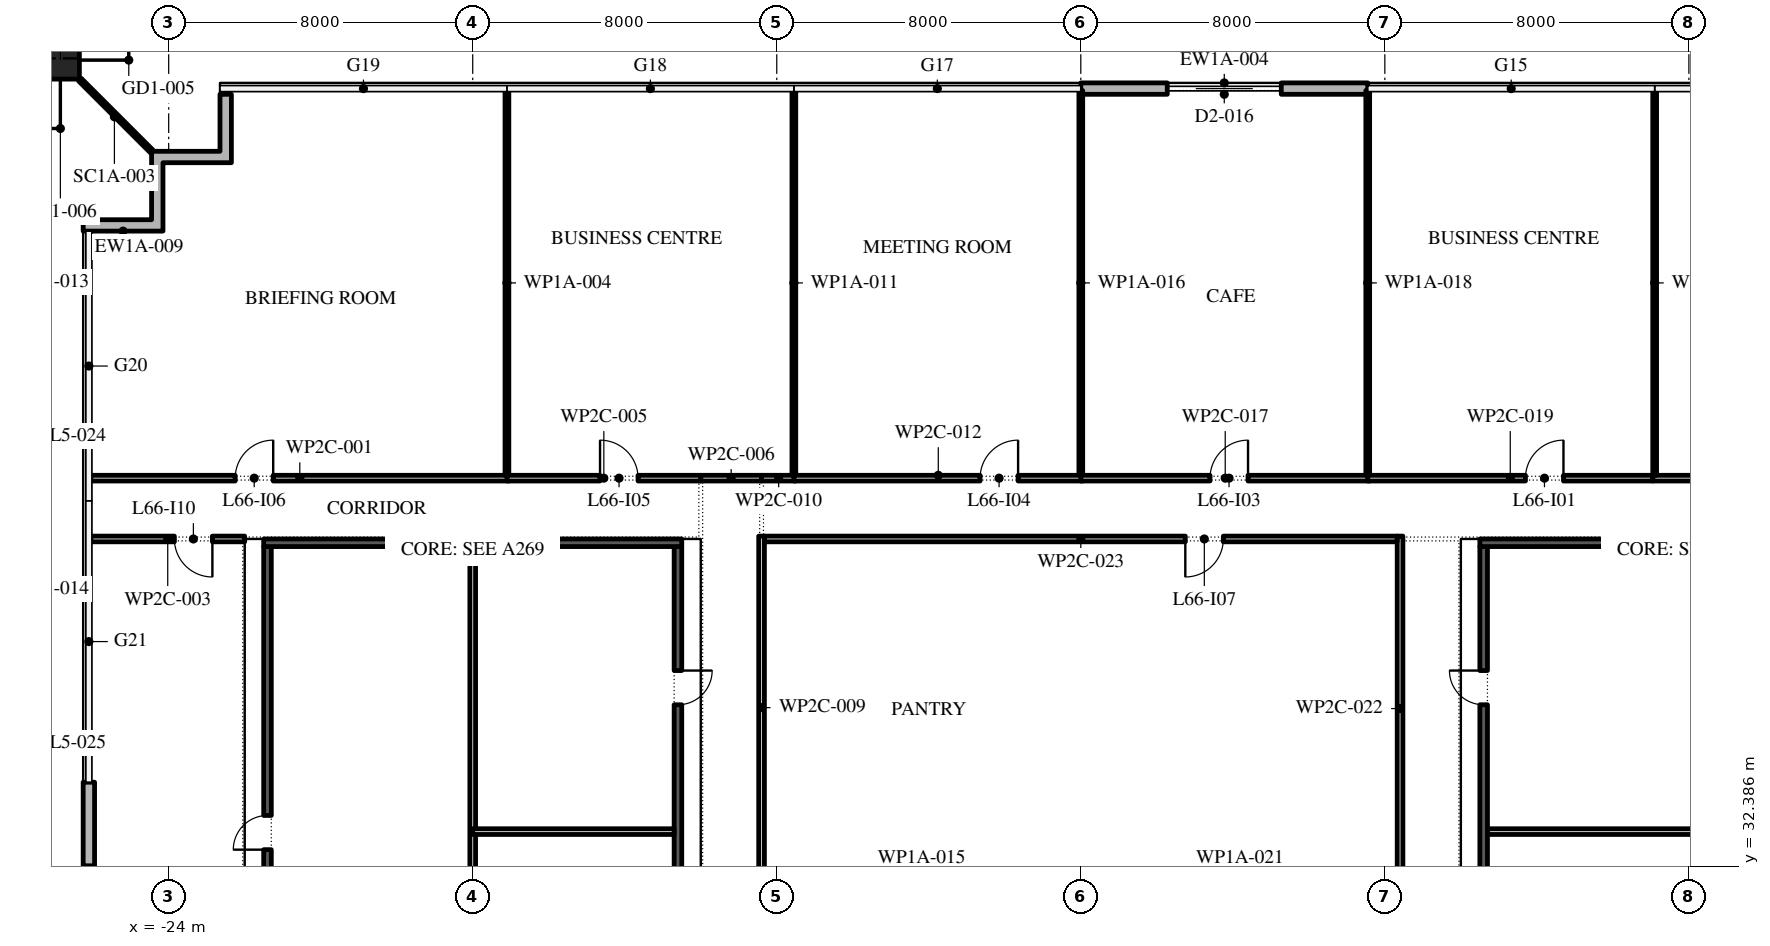
"""IFC4 building model, lengths in metres.
Left out: names, types, materials, properties, quantities, classifications, styles, units other than length and angle.
Written with IfcOpenShell. Run it as: python <this file> out.ifc"""

import sys

from ifc_helpers import new_model, si_unit, direction, frame, frame_2d, origin, origin_2d, place, context, subcontext, project, spatial, polyline, rectangle, outline, extrude, element, fill, save


model = new_model("IFC4")
c1 = context("Model", 3, precision=1e-05, world=origin(), true_north=direction((0.0, 1.0)))
c2 = subcontext(c1, "Body", "Model", "MODEL_VIEW")
j1 = project(units=[si_unit("LENGTHUNIT", "METRE"), si_unit("PLANEANGLEUNIT", "RADIAN")], contexts=[c1])
p1 = place(None, origin())
s1 = spatial("IfcSite", under=j1, at=p1, CompositionType="ELEMENT")
p2 = place(p1, origin())
s2 = spatial("IfcBuilding", under=s1, at=p2, CompositionType="ELEMENT")
p3 = place(p2, frame((0.0, 0.0, 303.0)))
s3 = spatial("IfcBuildingStorey", under=s2, at=p3, CompositionType="ELEMENT", Elevation=303.0)
p4 = place(p3, frame((-26.85, 53.6, 0.0), z_axis=(0.0, 0.090528438609, 0.995893870753), x_axis=(-1.0, 0.0, 0.0)))
e1 = element("IfcColumn", 1, at=p4, inside=s3, PredefinedType="COLUMN", context=c2, shape_type="SweptSolid", body=[
    extrude(rectangle(XDim=1.0, YDim=1.0, at=origin_2d()), origin(), (0.0, 0.0, 1.0), 6.025),
])
p5 = place(p3, frame((7.55, 52.85, 0.0), z_axis=(0.0, 0.0, 1.0), x_axis=(-1.0, 0.0, 0.0)))
e2 = element("IfcWall", 2, at=p5, inside=s3, PredefinedType="STANDARD", context=c2, shape_type="SweptSolid", body=[
    extrude(rectangle(XDim=7.55, YDim=0.3, at=frame_2d((3.775, 0.0))), origin(), (0.0, 0.0, 1.0), 5.8),
])
p6 = place(p5, frame((2.275, 0.0, 0.0)))
e3 = element("IfcOpeningElement", 3, at=p6, cuts=e2, PredefinedType="OPENING", context=c2, shape_type="SweptSolid", body=[
    extrude(rectangle(XDim=3.0, YDim=3.5, at=frame_2d((1.5, 1.75))), frame((0.0, 0.16, 0.0), z_axis=(0.0, -1.0, 0.0), x_axis=(1.0, 0.0, 0.0)), (0.0, 0.0, 1.0), 0.32),
])
p7 = place(p3, frame((-26.1, 34.6, 0.0), z_axis=(0.0, 0.0, 1.0), x_axis=(0.0, -1.0, 0.0)))
e4 = element("IfcWall", 4, at=p7, inside=s3, PredefinedType="STANDARD", context=c2, shape_type="SweptSolid", body=[
    extrude(rectangle(XDim=7.4, YDim=0.3, at=frame_2d((3.7, 0.0))), origin(), (0.0, 0.0, 1.0), 5.8),
])
p8 = place(p7, frame((2.2, 0.0, 0.0)))
e5 = element("IfcOpeningElement", 5, at=p8, cuts=e4, PredefinedType="OPENING", context=c2, shape_type="SweptSolid", body=[
    extrude(rectangle(XDim=3.0, YDim=3.5, at=frame_2d((1.5, 1.75))), frame((0.0, 0.16, 0.0), z_axis=(0.0, -1.0, 0.0), x_axis=(1.0, 0.0, 0.0)), (0.0, 0.0, 1.0), 0.32),
])
p9 = place(p3, origin())
e6 = element("IfcWall", 6, at=p9, inside=s3, PredefinedType="STANDARD", context=c2, shape_type="SweptSolid", body=[
    extrude(outline(polyline([(-24.45, 49.4), (-24.45, 51.2), (-22.65, 51.2), (-22.65, 52.7), (-22.35, 52.7), (-22.35, 50.9), (-24.15, 50.9), (-24.15, 49.1), (-26.25, 49.1), (-26.25, 49.4), (-24.45, 49.4)])), origin(), (0.0, 0.0, 1.0), 5.8),
])
p10 = place(p3, frame((-24.45, 51.2, 0.0), z_axis=(0.0, 0.0, 1.0), x_axis=(-0.707106781187, 0.707106781187, 0.0)))
e7 = element("IfcWall", 7, at=p10, inside=s3, PredefinedType="STANDARD", context=c2, shape_type="SweptSolid", body=[
    extrude(rectangle(XDim=2.667, YDim=0.1, at=frame_2d((1.333, 0.0))), origin(), (0.0, 0.0, 1.0), 5.8),
])
p11 = place(p3, frame((-21.4, 25.75, 0.0), z_axis=(0.0, 0.0, 1.0), x_axis=(0.0, 1.0, 0.0)))
e8 = element("IfcWall", 8, at=p11, inside=s3, PredefinedType="SHEAR", context=c2, shape_type="SweptSolid", body=[
    extrude(rectangle(XDim=15.05, YDim=0.2, at=frame_2d((7.525, 0.0))), origin(), (0.0, 0.0, 1.0), 5.8),
])
p12 = place(p11, frame((7.075, 0.0, 0.0)))
e9 = element("IfcOpeningElement", 9, at=p12, cuts=e8, PredefinedType="OPENING", context=c2, shape_type="SweptSolid", body=[
    extrude(rectangle(XDim=0.9, YDim=2.1, at=frame_2d((0.45, 1.05))), frame((0.0, 0.11, 0.0), z_axis=(0.0, -1.0, 0.0), x_axis=(1.0, 0.0, 0.0)), (0.0, 0.0, 1.0), 0.22),
])
p13 = place(p3, frame((-10.6, 25.75, 0.0), z_axis=(0.0, 0.0, 1.0), x_axis=(0.0, 1.0, 0.0)))
e10 = element("IfcWall", 10, at=p13, inside=s3, PredefinedType="SHEAR", context=c2, shape_type="SweptSolid", body=[
    extrude(rectangle(XDim=15.05, YDim=0.2, at=frame_2d((7.525, 0.0))), origin(), (0.0, 0.0, 1.0), 5.8),
])
p14 = place(p13, frame((3.288, 0.0, 0.0)))
e11 = element("IfcOpeningElement", 11, at=p14, cuts=e10, PredefinedType="OPENING", context=c2, shape_type="SweptSolid", body=[
    extrude(rectangle(XDim=0.9, YDim=2.1, at=frame_2d((0.45, 1.05))), frame((0.0, 0.11, 0.0), z_axis=(0.0, -1.0, 0.0), x_axis=(1.0, 0.0, 0.0)), (0.0, 0.0, 1.0), 0.22),
])
p15 = place(p13, frame((10.887, 0.0, 0.0)))
e12 = element("IfcOpeningElement", 12, at=p15, cuts=e10, PredefinedType="OPENING", context=c2, shape_type="SweptSolid", body=[
    extrude(rectangle(XDim=0.9, YDim=2.1, at=frame_2d((0.45, 1.05))), frame((0.0, 0.11, 0.0), z_axis=(0.0, -1.0, 0.0), x_axis=(1.0, 0.0, 0.0)), (0.0, 0.0, 1.0), 0.22),
])
p16 = place(p3, frame((-21.5, 40.9, 0.0), z_axis=(0.0, 0.0, 1.0), x_axis=(1.0, 0.0, 0.0)))
e13 = element("IfcWall", 13, at=p16, inside=s3, PredefinedType="SHEAR", context=c2, shape_type="SweptSolid", body=[
    extrude(rectangle(XDim=11.0, YDim=0.2, at=frame_2d((5.5, 0.0))), origin(), (0.0, 0.0, 1.0), 5.8),
])
p17 = place(p3, frame((-16.0, 25.75, 0.0), z_axis=(0.0, 0.0, 1.0), x_axis=(0.0, 1.0, 0.0)))
e14 = element("IfcWall", 14, at=p17, inside=s3, PredefinedType="PARTITIONING", context=c2, shape_type="SweptSolid", body=[
    extrude(rectangle(XDim=15.05, YDim=0.15, at=frame_2d((7.525, 0.0))), origin(), (0.0, 0.0, 1.0), 5.8),
])
p18 = place(p3, frame((-16.0, 33.3, 0.0), z_axis=(0.0, 0.0, 1.0), x_axis=(1.0, 0.0, 0.0)))
e15 = element("IfcWall", 15, at=p18, inside=s3, PredefinedType="PARTITIONING", context=c2, shape_type="SweptSolid", body=[
    extrude(rectangle(XDim=5.3, YDim=0.15, at=frame_2d((2.65, 0.0))), origin(), (0.0, 0.0, 1.0), 5.8),
])
p19 = place(p3, frame((10.6, 25.75, 0.0), z_axis=(0.0, 0.0, 1.0), x_axis=(0.0, 1.0, 0.0)))
e16 = element("IfcWall", 16, at=p19, inside=s3, PredefinedType="SHEAR", context=c2, shape_type="SweptSolid", body=[
    extrude(rectangle(XDim=15.05, YDim=0.2, at=frame_2d((7.525, 0.0))), origin(), (0.0, 0.0, 1.0), 5.8),
])
p20 = place(p19, frame((3.288, 0.0, 0.0)))
e17 = element("IfcOpeningElement", 17, at=p20, cuts=e16, PredefinedType="OPENING", context=c2, shape_type="SweptSolid", body=[
    extrude(rectangle(XDim=0.9, YDim=2.1, at=frame_2d((0.45, 1.05))), frame((0.0, 0.11, 0.0), z_axis=(0.0, -1.0, 0.0), x_axis=(1.0, 0.0, 0.0)), (0.0, 0.0, 1.0), 0.22),
])
p21 = place(p19, frame((10.887, 0.0, 0.0)))
e18 = element("IfcOpeningElement", 18, at=p21, cuts=e16, PredefinedType="OPENING", context=c2, shape_type="SweptSolid", body=[
    extrude(rectangle(XDim=0.9, YDim=2.1, at=frame_2d((0.45, 1.05))), frame((0.0, 0.11, 0.0), z_axis=(0.0, -1.0, 0.0), x_axis=(1.0, 0.0, 0.0)), (0.0, 0.0, 1.0), 0.22),
])
p22 = place(p3, frame((10.5, 40.9, 0.0), z_axis=(0.0, 0.0, 1.0), x_axis=(1.0, 0.0, 0.0)))
e19 = element("IfcWall", 19, at=p22, inside=s3, PredefinedType="SHEAR", context=c2, shape_type="SweptSolid", body=[
    extrude(rectangle(XDim=11.0, YDim=0.2, at=frame_2d((5.5, 0.0))), origin(), (0.0, 0.0, 1.0), 5.8),
])
p23 = place(p3, frame((10.7, 33.3, 0.0), z_axis=(0.0, 0.0, 1.0), x_axis=(1.0, 0.0, 0.0)))
e20 = element("IfcWall", 20, at=p23, inside=s3, PredefinedType="PARTITIONING", context=c2, shape_type="SweptSolid", body=[
    extrude(rectangle(XDim=10.6, YDim=0.15, at=frame_2d((5.3, 0.0))), origin(), (0.0, 0.0, 1.0), 5.8),
])
p24 = place(p3, frame((-26.05, 42.6, 0.0), z_axis=(0.0, 0.0, 1.0), x_axis=(1.0, 0.0, 0.0)))
e21 = element("IfcWall", 21, at=p24, inside=s3, PredefinedType="PARTITIONING", context=c2, shape_type="SweptSolid", body=[
    extrude(rectangle(XDim=11.0, YDim=0.15, at=frame_2d((5.5, 0.0))), origin(), (0.0, 0.0, 1.0), 5.8),
])
p25 = place(p24, frame((3.8, 0.0, 0.0)))
e22 = element("IfcOpeningElement", 22, at=p25, cuts=e21, PredefinedType="OPENING", context=c2, shape_type="SweptSolid", body=[
    extrude(rectangle(XDim=1.0, YDim=2.1, at=frame_2d((0.5, 1.05))), frame((0.0, 0.085, 0.0), z_axis=(0.0, -1.0, 0.0), x_axis=(1.0, 0.0, 0.0)), (0.0, 0.0, 1.0), 0.17),
])
p26 = place(p3, frame((-22.0, 41.0, 0.0), z_axis=(0.0, 0.0, 1.0), x_axis=(-1.0, 0.0, 0.0)))
e23 = element("IfcWall", 23, at=p26, inside=s3, PredefinedType="PARTITIONING", context=c2, shape_type="SweptSolid", body=[
    extrude(rectangle(XDim=4.05, YDim=0.15, at=frame_2d((2.025, 0.0))), origin(), (0.0, 0.0, 1.0), 5.8),
])
p27 = place(p26, frame((0.85, 0.0, 0.0)))
e24 = element("IfcOpeningElement", 24, at=p27, cuts=e23, PredefinedType="OPENING", context=c2, shape_type="SweptSolid", body=[
    extrude(rectangle(XDim=1.0, YDim=2.1, at=frame_2d((0.5, 1.05))), frame((0.0, 0.085, 0.0), z_axis=(0.0, -1.0, 0.0), x_axis=(1.0, 0.0, 0.0)), (0.0, 0.0, 1.0), 0.17),
])
p28 = place(p3, frame((-15.1, 42.675, 0.0), z_axis=(0.0, 0.0, 1.0), x_axis=(0.0, 1.0, 0.0)))
e25 = element("IfcWall", 25, at=p28, inside=s3, PredefinedType="PARTITIONING", context=c2, shape_type="SweptSolid", body=[
    extrude(rectangle(XDim=10.125, YDim=0.1, at=frame_2d((5.062, 0.0))), origin(), (0.0, 0.0, 1.0), 5.8),
])
p29 = place(p3, frame((-15.1, 42.6, 0.0), z_axis=(0.0, 0.0, 1.0), x_axis=(1.0, 0.0, 0.0)))
e26 = element("IfcWall", 26, at=p29, inside=s3, PredefinedType="PARTITIONING", context=c2, shape_type="SweptSolid", body=[
    extrude(rectangle(XDim=5.1, YDim=0.15, at=frame_2d((2.55, 0.0))), origin(), (0.0, 0.0, 1.0), 5.8),
])
p30 = place(p29, frame((2.45, 0.0, 0.0)))
e27 = element("IfcOpeningElement", 27, at=p30, cuts=e26, PredefinedType="OPENING", context=c2, shape_type="SweptSolid", body=[
    extrude(rectangle(XDim=1.0, YDim=2.1, at=frame_2d((0.5, 1.05))), frame((0.0, 0.085, 0.0), z_axis=(0.0, -1.0, 0.0), x_axis=(1.0, 0.0, 0.0)), (0.0, 0.0, 1.0), 0.17),
])
p31 = place(p3, frame((-10.0, 42.6, 0.0), z_axis=(0.0, 0.0, 1.0), x_axis=(1.0, 0.0, 0.0)))
e28 = element("IfcWall", 28, at=p31, inside=s3, PredefinedType="PARTITIONING", context=c2, shape_type="SweptSolid", body=[
    extrude(rectangle(XDim=1.6, YDim=0.15, at=frame_2d((0.8, 0.0))), origin(), (0.0, 0.0, 1.0), 5.8),
])
p32 = place(p3, frame((-8.4, 41.075, 0.0), z_axis=(0.0, 0.0, 1.0), x_axis=(0.0, -1.0, 0.0)))
e29 = element("IfcWall", 29, at=p32, inside=s3, PredefinedType="PARTITIONING", context=c2, shape_type="SweptSolid", body=[
    extrude(rectangle(XDim=9.025, YDim=0.15, at=frame_2d((4.512, 0.0))), origin(), (0.0, 0.0, 1.0), 5.8),
])
p33 = place(p3, frame((-8.4, 42.6, 0.0), z_axis=(0.0, 0.0, 1.0), x_axis=(1.0, 0.0, 0.0)))
e30 = element("IfcWall", 30, at=p33, inside=s3, PredefinedType="PARTITIONING", context=c2, shape_type="SweptSolid", body=[
    extrude(rectangle(XDim=0.9, YDim=0.15, at=frame_2d((0.45, 0.0))), origin(), (0.0, 0.0, 1.0), 5.8),
])
p34 = place(p3, frame((-7.55, 42.675, 0.0), z_axis=(0.0, 0.0, 1.0), x_axis=(0.0, 1.0, 0.0)))
e31 = element("IfcWall", 31, at=p34, inside=s3, PredefinedType="PARTITIONING", context=c2, shape_type="SweptSolid", body=[
    extrude(rectangle(XDim=10.125, YDim=0.1, at=frame_2d((5.062, 0.0))), origin(), (0.0, 0.0, 1.0), 5.8),
])
p35 = place(p3, frame((-7.55, 42.6, 0.0), z_axis=(0.0, 0.0, 1.0), x_axis=(1.0, 0.0, 0.0)))
e32 = element("IfcWall", 32, at=p35, inside=s3, PredefinedType="PARTITIONING", context=c2, shape_type="SweptSolid", body=[
    extrude(rectangle(XDim=7.6, YDim=0.15, at=frame_2d((3.8, 0.0))), origin(), (0.0, 0.0, 1.0), 5.8),
])
p36 = place(p35, frame((4.9, 0.0, 0.0)))
e33 = element("IfcOpeningElement", 33, at=p36, cuts=e32, PredefinedType="OPENING", context=c2, shape_type="SweptSolid", body=[
    extrude(rectangle(XDim=1.0, YDim=2.1, at=frame_2d((0.5, 1.05))), frame((0.0, 0.085, 0.0), z_axis=(0.0, -1.0, 0.0), x_axis=(1.0, 0.0, 0.0)), (0.0, 0.0, 1.0), 0.17),
])
p37 = place(p3, frame((0.0, 42.675, 0.0), z_axis=(0.0, 0.0, 1.0), x_axis=(0.0, 1.0, 0.0)))
e34 = element("IfcWall", 34, at=p37, inside=s3, PredefinedType="PARTITIONING", context=c2, shape_type="SweptSolid", body=[
    extrude(rectangle(XDim=10.125, YDim=0.1, at=frame_2d((5.062, 0.0))), origin(), (0.0, 0.0, 1.0), 5.8),
])
p38 = place(p3, frame((0.0, 42.6, 0.0), z_axis=(0.0, 0.0, 1.0), x_axis=(1.0, 0.0, 0.0)))
e35 = element("IfcWall", 35, at=p38, inside=s3, PredefinedType="PARTITIONING", context=c2, shape_type="SweptSolid", body=[
    extrude(rectangle(XDim=7.6, YDim=0.15, at=frame_2d((3.8, 0.0))), origin(), (0.0, 0.0, 1.0), 5.8),
])
p39 = place(p38, frame((3.4, 0.0, 0.0)))
e36 = element("IfcOpeningElement", 36, at=p39, cuts=e35, PredefinedType="OPENING", context=c2, shape_type="SweptSolid", body=[
    extrude(rectangle(XDim=1.0, YDim=2.1, at=frame_2d((0.5, 1.05))), frame((0.0, 0.085, 0.0), z_axis=(0.0, -1.0, 0.0), x_axis=(1.0, 0.0, 0.0)), (0.0, 0.0, 1.0), 0.17),
])
p40 = place(p3, frame((7.55, 42.675, 0.0), z_axis=(0.0, 0.0, 1.0), x_axis=(0.0, 1.0, 0.0)))
e37 = element("IfcWall", 37, at=p40, inside=s3, PredefinedType="PARTITIONING", context=c2, shape_type="SweptSolid", body=[
    extrude(rectangle(XDim=10.125, YDim=0.1, at=frame_2d((5.062, 0.0))), origin(), (0.0, 0.0, 1.0), 5.8),
])
p41 = place(p3, frame((7.55, 42.6, 0.0), z_axis=(0.0, 0.0, 1.0), x_axis=(1.0, 0.0, 0.0)))
e38 = element("IfcWall", 38, at=p41, inside=s3, PredefinedType="PARTITIONING", context=c2, shape_type="SweptSolid", body=[
    extrude(rectangle(XDim=7.5, YDim=0.15, at=frame_2d((3.75, 0.0))), origin(), (0.0, 0.0, 1.0), 5.8),
])
p42 = place(p41, frame((4.15, 0.0, 0.0)))
e39 = element("IfcOpeningElement", 39, at=p42, cuts=e38, PredefinedType="OPENING", context=c2, shape_type="SweptSolid", body=[
    extrude(rectangle(XDim=1.0, YDim=2.1, at=frame_2d((0.5, 1.05))), frame((0.0, 0.085, 0.0), z_axis=(0.0, -1.0, 0.0), x_axis=(1.0, 0.0, 0.0)), (0.0, 0.0, 1.0), 0.17),
])
p43 = place(p3, frame((8.4, 32.0, 0.0), z_axis=(0.0, 0.0, 1.0), x_axis=(0.0, 1.0, 0.0)))
e40 = element("IfcWall", 40, at=p43, inside=s3, PredefinedType="PARTITIONING", context=c2, shape_type="SweptSolid", body=[
    extrude(rectangle(XDim=9.075, YDim=0.15, at=frame_2d((4.538, 0.0))), origin(), (0.0, 0.0, 1.0), 5.8),
])
p44 = place(p3, frame((8.325, 41.0, 0.0), z_axis=(0.0, 0.0, 1.0), x_axis=(-1.0, 0.0, 0.0)))
e41 = element("IfcWall", 41, at=p44, inside=s3, PredefinedType="PARTITIONING", context=c2, shape_type="SweptSolid", body=[
    extrude(rectangle(XDim=16.65, YDim=0.15, at=frame_2d((8.325, 0.0))), origin(), (0.0, 0.0, 1.0), 5.8),
])
p45 = place(p44, frame((4.575, 0.0, 0.0)))
e42 = element("IfcOpeningElement", 42, at=p45, cuts=e41, PredefinedType="OPENING", context=c2, shape_type="SweptSolid", body=[
    extrude(rectangle(XDim=1.0, YDim=2.1, at=frame_2d((0.5, 1.05))), frame((0.0, 0.085, 0.0), z_axis=(0.0, -1.0, 0.0), x_axis=(1.0, 0.0, 0.0)), (0.0, 0.0, 1.0), 0.17),
])
p46 = place(p3, frame((15.05, 42.6, 0.0), z_axis=(0.0, 0.0, 1.0), x_axis=(1.0, 0.0, 0.0)))
e43 = element("IfcWall", 43, at=p46, inside=s3, PredefinedType="PARTITIONING", context=c2, shape_type="SweptSolid", body=[
    extrude(rectangle(XDim=11.0, YDim=0.15, at=frame_2d((5.5, 0.0))), origin(), (0.0, 0.0, 1.0), 5.8),
])
p47 = place(p46, frame((5.05, 0.0, 0.0)))
e44 = element("IfcOpeningElement", 44, at=p47, cuts=e43, PredefinedType="OPENING", context=c2, shape_type="SweptSolid", body=[
    extrude(rectangle(XDim=1.0, YDim=2.1, at=frame_2d((0.5, 1.05))), frame((0.0, 0.085, 0.0), z_axis=(0.0, -1.0, 0.0), x_axis=(1.0, 0.0, 0.0)), (0.0, 0.0, 1.0), 0.17),
])
p48 = place(p3, frame((15.1, 52.8, 0.0), z_axis=(0.0, 0.0, 1.0), x_axis=(0.0, -1.0, 0.0)))
e45 = element("IfcWall", 45, at=p48, inside=s3, PredefinedType="PARTITIONING", context=c2, shape_type="SweptSolid", body=[
    extrude(rectangle(XDim=10.125, YDim=0.1, at=frame_2d((5.062, 0.0))), origin(), (0.0, 0.0, 1.0), 5.8),
])
p49 = place(p6, origin())
e46 = element("IfcDoor", 46, at=p49, inside=s3, OperationType="DOUBLE_DOOR_SLIDING", PredefinedType="DOOR", context=c2, shape_type="SweptSolid", body=[
    extrude(rectangle(XDim=3.0, YDim=3.5, at=frame_2d((1.5, 1.75))), frame((0.0, 0.025, 0.0), z_axis=(0.0, -1.0, 0.0), x_axis=(1.0, 0.0, 0.0)), (0.0, 0.0, 1.0), 0.05),
])
fill(e3, e46)
p50 = place(p8, origin())
e47 = element("IfcDoor", 47, at=p50, inside=s3, OperationType="DOUBLE_DOOR_SLIDING", PredefinedType="DOOR", context=c2, shape_type="SweptSolid", body=[
    extrude(rectangle(XDim=3.0, YDim=3.5, at=frame_2d((1.5, 1.75))), frame((0.0, 0.025, 0.0), z_axis=(0.0, -1.0, 0.0), x_axis=(1.0, 0.0, 0.0)), (0.0, 0.0, 1.0), 0.05),
])
fill(e5, e47)
p51 = place(p12, origin())
e48 = element("IfcDoor", 48, at=p51, inside=s3, OperationType="SINGLE_SWING_RIGHT", PredefinedType="DOOR", context=c2, shape_type="SweptSolid", body=[
    extrude(rectangle(XDim=0.9, YDim=2.1, at=frame_2d((0.45, 1.05))), frame((0.0, -0.05, 0.0), z_axis=(0.0, -1.0, 0.0), x_axis=(1.0, 0.0, 0.0)), (0.0, 0.0, 1.0), 0.05),
])
fill(e9, e48)
p52 = place(p15, frame((0.9, 0.15, 0.0), z_axis=(0.0, 0.0, 1.0), x_axis=(-1.0, 0.0, 0.0)))
e49 = element("IfcDoor", 49, at=p52, inside=s3, OperationType="SINGLE_SWING_RIGHT", PredefinedType="DOOR", context=c2, shape_type="SweptSolid", body=[
    extrude(rectangle(XDim=0.9, YDim=2.1, at=frame_2d((0.45, 1.05))), frame((0.0, 0.1, 0.0), z_axis=(0.0, -1.0, 0.0), x_axis=(1.0, 0.0, 0.0)), (0.0, 0.0, 1.0), 0.05),
])
fill(e12, e49)
p53 = place(p21, origin())
e50 = element("IfcDoor", 50, at=p53, inside=s3, OperationType="SINGLE_SWING_LEFT", PredefinedType="DOOR", context=c2, shape_type="SweptSolid", body=[
    extrude(rectangle(XDim=0.9, YDim=2.1, at=frame_2d((0.45, 1.05))), frame((0.0, -0.05, 0.0), z_axis=(0.0, -1.0, 0.0), x_axis=(1.0, 0.0, 0.0)), (0.0, 0.0, 1.0), 0.05),
])
fill(e18, e50)
p54 = place(p42, origin())
e51 = element("IfcDoor", 51, at=p54, inside=s3, OperationType="SINGLE_SWING_LEFT", PredefinedType="DOOR", context=c2, shape_type="SweptSolid", body=[
    extrude(rectangle(XDim=1.0, YDim=2.1, at=frame_2d((0.5, 1.05))), frame((0.0, 0.025, 0.0), z_axis=(0.0, -1.0, 0.0), x_axis=(1.0, 0.0, 0.0)), (0.0, 0.0, 1.0), 0.05),
])
fill(e39, e51)
p55 = place(p39, origin())
e52 = element("IfcDoor", 52, at=p55, inside=s3, OperationType="SINGLE_SWING_LEFT", PredefinedType="DOOR", context=c2, shape_type="SweptSolid", body=[
    extrude(rectangle(XDim=1.0, YDim=2.1, at=frame_2d((0.5, 1.05))), frame((0.0, 0.025, 0.0), z_axis=(0.0, -1.0, 0.0), x_axis=(1.0, 0.0, 0.0)), (0.0, 0.0, 1.0), 0.05),
])
fill(e36, e52)
p56 = place(p36, origin())
e53 = element("IfcDoor", 53, at=p56, inside=s3, OperationType="SINGLE_SWING_LEFT", PredefinedType="DOOR", context=c2, shape_type="SweptSolid", body=[
    extrude(rectangle(XDim=1.0, YDim=2.1, at=frame_2d((0.5, 1.05))), frame((0.0, 0.025, 0.0), z_axis=(0.0, -1.0, 0.0), x_axis=(1.0, 0.0, 0.0)), (0.0, 0.0, 1.0), 0.05),
])
fill(e33, e53)
p57 = place(p30, origin())
e54 = element("IfcDoor", 54, at=p57, inside=s3, OperationType="SINGLE_SWING_RIGHT", PredefinedType="DOOR", context=c2, shape_type="SweptSolid", body=[
    extrude(rectangle(XDim=1.0, YDim=2.1, at=frame_2d((0.5, 1.05))), frame((0.0, 0.025, 0.0), z_axis=(0.0, -1.0, 0.0), x_axis=(1.0, 0.0, 0.0)), (0.0, 0.0, 1.0), 0.05),
])
fill(e27, e54)
p58 = place(p25, origin())
e55 = element("IfcDoor", 55, at=p58, inside=s3, OperationType="SINGLE_SWING_LEFT", PredefinedType="DOOR", context=c2, shape_type="SweptSolid", body=[
    extrude(rectangle(XDim=1.0, YDim=2.1, at=frame_2d((0.5, 1.05))), frame((0.0, 0.025, 0.0), z_axis=(0.0, -1.0, 0.0), x_axis=(1.0, 0.0, 0.0)), (0.0, 0.0, 1.0), 0.05),
])
fill(e22, e55)
p59 = place(p45, origin())
e56 = element("IfcDoor", 56, at=p59, inside=s3, OperationType="SINGLE_SWING_LEFT", PredefinedType="DOOR", context=c2, shape_type="SweptSolid", body=[
    extrude(rectangle(XDim=1.0, YDim=2.1, at=frame_2d((0.5, 1.05))), frame((0.0, 0.025, 0.0), z_axis=(0.0, -1.0, 0.0), x_axis=(1.0, 0.0, 0.0)), (0.0, 0.0, 1.0), 0.05),
])
fill(e42, e56)
p60 = place(p27, origin())
e57 = element("IfcDoor", 57, at=p60, inside=s3, OperationType="SINGLE_SWING_RIGHT", PredefinedType="DOOR", context=c2, shape_type="SweptSolid", body=[
    extrude(rectangle(XDim=1.0, YDim=2.1, at=frame_2d((0.5, 1.05))), frame((0.0, 0.025, 0.0), z_axis=(0.0, -1.0, 0.0), x_axis=(1.0, 0.0, 0.0)), (0.0, 0.0, 1.0), 0.05),
])
fill(e24, e57)
save(model, sys.argv[1])
